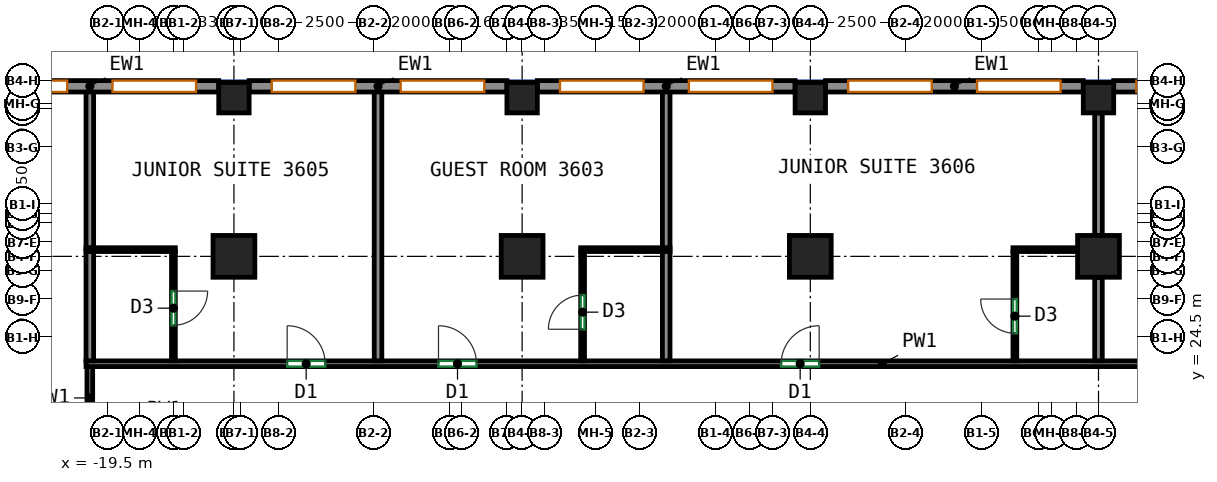
"""IFC4 building model, lengths in metres.
Left out: names, types, materials, properties, quantities, classifications, styles, units other than length and angle.
Written with IfcOpenShell. Run it as: python <this file> out.ifc"""

import sys

from ifc_helpers import new_model, si_unit, direction, frame, frame_2d, origin, origin_2d, place, context, subcontext, project, spatial, rectangle, extrude, source, transform, mapped, element, fill, save


model = new_model("IFC4")
c1 = context("Model", 3, precision=1e-05, world=origin(), true_north=direction((0.0, 1.0)))
c2 = subcontext(c1, "Body", "Model", "MODEL_VIEW")
j1 = project(units=[si_unit("LENGTHUNIT", "METRE"), si_unit("PLANEANGLEUNIT", "RADIAN")], contexts=[c1])
p1 = place(None, origin())
s1 = spatial("IfcSite", under=j1, at=p1, CompositionType="ELEMENT")
p2 = place(p1, origin())
s2 = spatial("IfcBuilding", under=s1, at=p2, CompositionType="ELEMENT")
p3 = place(p2, frame((0.0, 0.0, 157.5)))
s3 = spatial("IfcBuildingStorey", under=s2, at=p3, CompositionType="ELEMENT", Elevation=157.5)
m1 = source(origin(), c2, "Body", "SweptSolid", [
    extrude(rectangle(XDim=1.1, YDim=1.1, at=origin_2d()), origin(), (0.0, 0.0, 1.0), 3.12),
])
p4 = place(p3, frame((-16.167, 26.625, 0.0), z_axis=(0.0, 0.0, 1.0), x_axis=(1.0, 0.0, 0.0)))
e1 = element("IfcColumn", 1, at=p4, inside=s3, PredefinedType="COLUMN", context=c2, shape_type="MappedRepresentation", body=[
    mapped(m1, transform((0.0, 0.0, 0.0))),
])
m2 = source(origin(), c2, "Body", "SweptSolid", [
    extrude(rectangle(XDim=0.8, YDim=0.8, at=origin_2d()), origin(), (0.0, 0.0, 1.0), 3.12),
])
p5 = place(p3, frame((-16.167, 30.8, 0.0), z_axis=(0.0, 0.0, 1.0), x_axis=(1.0, 0.0, 0.0)))
e2 = element("IfcColumn", 2, at=p5, inside=s3, PredefinedType="COLUMN", context=c2, shape_type="MappedRepresentation", body=[
    mapped(m2, transform((0.0, 0.0, 0.0))),
])
p6 = place(p3, frame((-8.583, 26.625, 0.0), z_axis=(0.0, 0.0, 1.0), x_axis=(1.0, 0.0, 0.0)))
e3 = element("IfcColumn", 3, at=p6, inside=s3, PredefinedType="COLUMN", context=c2, shape_type="MappedRepresentation", body=[
    mapped(m1, transform((0.0, 0.0, 0.0))),
])
p7 = place(p3, frame((-8.583, 30.8, 0.0), z_axis=(0.0, 0.0, 1.0), x_axis=(1.0, 0.0, 0.0)))
e4 = element("IfcColumn", 4, at=p7, inside=s3, PredefinedType="COLUMN", context=c2, shape_type="MappedRepresentation", body=[
    mapped(m2, transform((0.0, 0.0, 0.0))),
])
p8 = place(p3, frame((-1.0, 26.625, 0.0), z_axis=(0.0, 0.0, 1.0), x_axis=(1.0, 0.0, 0.0)))
e5 = element("IfcColumn", 5, at=p8, inside=s3, PredefinedType="COLUMN", context=c2, shape_type="MappedRepresentation", body=[
    mapped(m1, transform((0.0, 0.0, 0.0))),
])
p9 = place(p3, frame((-1.0, 30.8, 0.0), z_axis=(0.0, 0.0, 1.0), x_axis=(1.0, 0.0, 0.0)))
e6 = element("IfcColumn", 6, at=p9, inside=s3, PredefinedType="COLUMN", context=c2, shape_type="MappedRepresentation", body=[
    mapped(m2, transform((0.0, 0.0, 0.0))),
])
p10 = place(p3, frame((6.583, 26.625, 0.0), z_axis=(0.0, 0.0, 1.0), x_axis=(1.0, 0.0, 0.0)))
e7 = element("IfcColumn", 7, at=p10, inside=s3, PredefinedType="COLUMN", context=c2, shape_type="MappedRepresentation", body=[
    mapped(m1, transform((0.0, 0.0, 0.0))),
])
p11 = place(p3, frame((6.583, 30.8, 0.0), z_axis=(0.0, 0.0, 1.0), x_axis=(1.0, 0.0, 0.0)))
e8 = element("IfcColumn", 8, at=p11, inside=s3, PredefinedType="COLUMN", context=c2, shape_type="MappedRepresentation", body=[
    mapped(m2, transform((0.0, 0.0, 0.0))),
])
m3 = source(origin(), c2, "Body", "SweptSolid", [
    extrude(rectangle(XDim=6.783, YDim=0.3, at=frame_2d((3.392, 0.0))), origin(), (0.0, 0.0, 1.0), 3.12),
])
p12 = place(p3, frame((13.767, 31.1, 0.0), z_axis=(0.0, 0.0, 1.0), x_axis=(-1.0, 0.0, 0.0)))
e9 = element("IfcWall", 9, at=p12, inside=s3, PredefinedType="SOLIDWALL", context=c2, shape_type="MappedRepresentation", body=[
    mapped(m3, transform((0.0, 0.0, 0.0))),
])
p13 = place(p12, frame((0.596, 0.0, 0.85)))
e10 = element("IfcOpeningElement", 10, at=p13, cuts=e9, PredefinedType="OPENING", context=c2, shape_type="SweptSolid", body=[
    extrude(rectangle(XDim=2.2, YDim=1.95, at=frame_2d((1.1, 0.975))), frame((0.0, 0.16, 0.0), z_axis=(0.0, -1.0, 0.0), x_axis=(1.0, 0.0, 0.0)), (0.0, 0.0, 1.0), 0.32),
])
p14 = place(p12, frame((3.988, 0.0, 0.85)))
e11 = element("IfcOpeningElement", 11, at=p14, cuts=e9, PredefinedType="OPENING", context=c2, shape_type="SweptSolid", body=[
    extrude(rectangle(XDim=2.2, YDim=1.95, at=frame_2d((1.1, 0.975))), frame((0.0, 0.16, 0.0), z_axis=(0.0, -1.0, 0.0), x_axis=(1.0, 0.0, 0.0)), (0.0, 0.0, 1.0), 0.32),
])
m4 = source(origin(), c2, "Body", "SweptSolid", [
    extrude(rectangle(XDim=6.783, YDim=0.3, at=frame_2d((3.392, 0.0))), origin(), (0.0, 0.0, 1.0), 3.12),
])
p15 = place(p3, frame((6.183, 31.1, 0.0), z_axis=(0.0, 0.0, 1.0), x_axis=(-1.0, 0.0, 0.0)))
e12 = element("IfcWall", 12, at=p15, inside=s3, PredefinedType="SOLIDWALL", context=c2, shape_type="MappedRepresentation", body=[
    mapped(m4, transform((0.0, 0.0, 0.0))),
])
p16 = place(p15, frame((0.596, 0.0, 0.85)))
e13 = element("IfcOpeningElement", 13, at=p16, cuts=e12, PredefinedType="OPENING", context=c2, shape_type="SweptSolid", body=[
    extrude(rectangle(XDim=2.2, YDim=1.95, at=frame_2d((1.1, 0.975))), frame((0.0, 0.16, 0.0), z_axis=(0.0, -1.0, 0.0), x_axis=(1.0, 0.0, 0.0)), (0.0, 0.0, 1.0), 0.32),
])
p17 = place(p15, frame((3.988, 0.0, 0.85)))
e14 = element("IfcOpeningElement", 14, at=p17, cuts=e12, PredefinedType="OPENING", context=c2, shape_type="SweptSolid", body=[
    extrude(rectangle(XDim=2.2, YDim=1.95, at=frame_2d((1.1, 0.975))), frame((0.0, 0.16, 0.0), z_axis=(0.0, -1.0, 0.0), x_axis=(1.0, 0.0, 0.0)), (0.0, 0.0, 1.0), 0.32),
])
p18 = place(p3, frame((-1.4, 31.1, 0.0), z_axis=(0.0, 0.0, 1.0), x_axis=(-1.0, 0.0, 0.0)))
e15 = element("IfcWall", 15, at=p18, inside=s3, PredefinedType="SOLIDWALL", context=c2, shape_type="MappedRepresentation", body=[
    mapped(m4, transform((0.0, 0.0, 0.0))),
])
p19 = place(p18, frame((0.596, 0.0, 0.85)))
e16 = element("IfcOpeningElement", 16, at=p19, cuts=e15, PredefinedType="OPENING", context=c2, shape_type="SweptSolid", body=[
    extrude(rectangle(XDim=2.2, YDim=1.95, at=frame_2d((1.1, 0.975))), frame((0.0, 0.16, 0.0), z_axis=(0.0, -1.0, 0.0), x_axis=(1.0, 0.0, 0.0)), (0.0, 0.0, 1.0), 0.32),
])
p20 = place(p18, frame((3.988, 0.0, 0.85)))
e17 = element("IfcOpeningElement", 17, at=p20, cuts=e15, PredefinedType="OPENING", context=c2, shape_type="SweptSolid", body=[
    extrude(rectangle(XDim=2.2, YDim=1.95, at=frame_2d((1.1, 0.975))), frame((0.0, 0.16, 0.0), z_axis=(0.0, -1.0, 0.0), x_axis=(1.0, 0.0, 0.0)), (0.0, 0.0, 1.0), 0.32),
])
p21 = place(p3, frame((-8.983, 31.1, 0.0), z_axis=(0.0, 0.0, 1.0), x_axis=(-1.0, 0.0, 0.0)))
e18 = element("IfcWall", 18, at=p21, inside=s3, PredefinedType="SOLIDWALL", context=c2, shape_type="MappedRepresentation", body=[
    mapped(m3, transform((0.0, 0.0, 0.0))),
])
p22 = place(p21, frame((0.596, 0.0, 0.85)))
e19 = element("IfcOpeningElement", 19, at=p22, cuts=e18, PredefinedType="OPENING", context=c2, shape_type="SweptSolid", body=[
    extrude(rectangle(XDim=2.2, YDim=1.95, at=frame_2d((1.1, 0.975))), frame((0.0, 0.16, 0.0), z_axis=(0.0, -1.0, 0.0), x_axis=(1.0, 0.0, 0.0)), (0.0, 0.0, 1.0), 0.32),
])
p23 = place(p21, frame((3.988, 0.0, 0.85)))
e20 = element("IfcOpeningElement", 20, at=p23, cuts=e18, PredefinedType="OPENING", context=c2, shape_type="SweptSolid", body=[
    extrude(rectangle(XDim=2.2, YDim=1.95, at=frame_2d((1.1, 0.975))), frame((0.0, 0.16, 0.0), z_axis=(0.0, -1.0, 0.0), x_axis=(1.0, 0.0, 0.0)), (0.0, 0.0, 1.0), 0.32),
])
p24 = place(p3, frame((-16.567, 31.1, 0.0), z_axis=(0.0, 0.0, 1.0), x_axis=(-1.0, 0.0, 0.0)))
e21 = element("IfcWall", 21, at=p24, inside=s3, PredefinedType="SOLIDWALL", context=c2, shape_type="MappedRepresentation", body=[
    mapped(m4, transform((0.0, 0.0, 0.0))),
])
p25 = place(p24, frame((0.596, 0.0, 0.85)))
e22 = element("IfcOpeningElement", 22, at=p25, cuts=e21, PredefinedType="OPENING", context=c2, shape_type="SweptSolid", body=[
    extrude(rectangle(XDim=2.2, YDim=1.95, at=frame_2d((1.1, 0.975))), frame((0.0, 0.16, 0.0), z_axis=(0.0, -1.0, 0.0), x_axis=(1.0, 0.0, 0.0)), (0.0, 0.0, 1.0), 0.32),
])
p26 = place(p24, frame((3.988, 0.0, 0.85)))
e23 = element("IfcOpeningElement", 23, at=p26, cuts=e21, PredefinedType="OPENING", context=c2, shape_type="SweptSolid", body=[
    extrude(rectangle(XDim=2.2, YDim=1.95, at=frame_2d((1.1, 0.975))), frame((0.0, 0.16, 0.0), z_axis=(0.0, -1.0, 0.0), x_axis=(1.0, 0.0, 0.0)), (0.0, 0.0, 1.0), 0.32),
])
p27 = place(p3, frame((-19.959, 22.075, 0.0), z_axis=(0.0, 0.0, 1.0), x_axis=(0.0, 1.0, 0.0)))
e24 = element("IfcWall", 24, at=p27, inside=s3, PredefinedType="PARTITIONING", context=c2, shape_type="SweptSolid", body=[
    extrude(rectangle(XDim=1.65, YDim=0.15, at=frame_2d((0.825, 0.0))), origin(), (0.0, 0.0, 1.0), 3.12),
])
p28 = place(p3, frame((-20.059, 23.8, 0.0), z_axis=(0.0, 0.0, 1.0), x_axis=(1.0, 0.0, 0.0)))
e25 = element("IfcWall", 25, at=p28, inside=s3, PredefinedType="PARTITIONING", context=c2, shape_type="SweptSolid", body=[
    extrude(rectangle(XDim=41.909, YDim=0.15, at=frame_2d((20.955, 0.0))), origin(), (0.0, 0.0, 1.0), 3.12),
])
p29 = place(p28, frame((5.293, 0.0, 0.0)))
e26 = element("IfcOpeningElement", 26, at=p29, cuts=e25, PredefinedType="OPENING", context=c2, shape_type="SweptSolid", body=[
    extrude(rectangle(XDim=1.0, YDim=2.1, at=frame_2d((0.5, 1.05))), frame((0.0, 0.085, 0.0), z_axis=(0.0, -1.0, 0.0), x_axis=(1.0, 0.0, 0.0)), (0.0, 0.0, 1.0), 0.17),
])
p30 = place(p28, frame((9.275, 0.0, 0.0)))
e27 = element("IfcOpeningElement", 27, at=p30, cuts=e25, PredefinedType="OPENING", context=c2, shape_type="SweptSolid", body=[
    extrude(rectangle(XDim=1.0, YDim=2.1, at=frame_2d((0.5, 1.05))), frame((0.0, 0.085, 0.0), z_axis=(0.0, -1.0, 0.0), x_axis=(1.0, 0.0, 0.0)), (0.0, 0.0, 1.0), 0.17),
])
p31 = place(p28, frame((18.292, 0.0, 0.0)))
e28 = element("IfcOpeningElement", 28, at=p31, cuts=e25, PredefinedType="OPENING", context=c2, shape_type="SweptSolid", body=[
    extrude(rectangle(XDim=1.0, YDim=2.1, at=frame_2d((0.5, 1.05))), frame((0.0, 0.085, 0.0), z_axis=(0.0, -1.0, 0.0), x_axis=(1.0, 0.0, 0.0)), (0.0, 0.0, 1.0), 0.17),
])
p32 = place(p28, frame((30.636, 0.0, 0.0)))
e29 = element("IfcOpeningElement", 29, at=p32, cuts=e25, PredefinedType="OPENING", context=c2, shape_type="SweptSolid", body=[
    extrude(rectangle(XDim=1.0, YDim=2.1, at=frame_2d((0.5, 1.05))), frame((0.0, 0.085, 0.0), z_axis=(0.0, -1.0, 0.0), x_axis=(1.0, 0.0, 0.0)), (0.0, 0.0, 1.0), 0.17),
])
p33 = place(p28, frame((36.828, 0.0, 0.0)))
e30 = element("IfcOpeningElement", 30, at=p33, cuts=e25, PredefinedType="OPENING", context=c2, shape_type="SweptSolid", body=[
    extrude(rectangle(XDim=1.0, YDim=2.1, at=frame_2d((0.5, 1.05))), frame((0.0, 0.085, 0.0), z_axis=(0.0, -1.0, 0.0), x_axis=(1.0, 0.0, 0.0)), (0.0, 0.0, 1.0), 0.17),
])
p34 = place(p28, frame((38.314, 0.0, 0.0)))
e31 = element("IfcOpeningElement", 31, at=p34, cuts=e25, PredefinedType="OPENING", context=c2, shape_type="SweptSolid", body=[
    extrude(rectangle(XDim=1.0, YDim=2.1, at=frame_2d((0.5, 1.05))), frame((0.0, 0.085, 0.0), z_axis=(0.0, -1.0, 0.0), x_axis=(1.0, 0.0, 0.0)), (0.0, 0.0, 1.0), 0.17),
])
p35 = place(p3, frame((-19.959, 26.842, 0.0), z_axis=(0.0, 0.0, 1.0), x_axis=(0.0, 1.0, 0.0)))
e32 = element("IfcWall", 32, at=p35, inside=s3, PredefinedType="PARTITIONING", context=c2, shape_type="SweptSolid", body=[
    extrude(rectangle(XDim=4.158, YDim=0.2, at=frame_2d((2.079, 0.0))), origin(), (0.0, 0.0, 1.0), 3.12),
])
p36 = place(p3, frame((-19.959, 23.877, 0.0), z_axis=(0.0, 0.0, 1.0), x_axis=(0.0, 1.0, 0.0)))
e33 = element("IfcWall", 33, at=p36, inside=s3, PredefinedType="PARTITIONING", context=c2, shape_type="SweptSolid", body=[
    extrude(rectangle(XDim=2.885, YDim=0.2, at=frame_2d((1.442, 0.0))), origin(), (0.0, 0.0, 1.0), 3.12),
])
p37 = place(p3, frame((-17.759, 26.752, 0.0), z_axis=(0.0, 0.0, 1.0), x_axis=(0.0, -1.0, 0.0)))
e34 = element("IfcWall", 34, at=p37, inside=s3, PredefinedType="PARTITIONING", context=c2, shape_type="SweptSolid", body=[
    extrude(rectangle(XDim=2.875, YDim=0.1, at=frame_2d((1.438, 0.0))), origin(), (0.0, 0.0, 1.0), 3.12),
])
p38 = place(p37, frame((1.04, 0.0, 0.0)))
e35 = element("IfcOpeningElement", 35, at=p38, cuts=e34, PredefinedType="OPENING", context=c2, shape_type="SweptSolid", body=[
    extrude(rectangle(XDim=0.9, YDim=2.1, at=frame_2d((0.45, 1.05))), frame((0.0, 0.06, 0.0), z_axis=(0.0, -1.0, 0.0), x_axis=(1.0, 0.0, 0.0)), (0.0, 0.0, 1.0), 0.12),
])
p39 = place(p3, frame((-20.059, 26.802, 0.0), z_axis=(0.0, 0.0, 1.0), x_axis=(1.0, 0.0, 0.0)))
e36 = element("IfcWall", 36, at=p39, inside=s3, PredefinedType="PARTITIONING", context=c2, shape_type="SweptSolid", body=[
    extrude(rectangle(XDim=2.35, YDim=0.1, at=frame_2d((1.175, 0.0))), origin(), (0.0, 0.0, 1.0), 3.12),
])
p40 = place(p3, frame((-12.375, 23.877, 0.0), z_axis=(0.0, 0.0, 1.0), x_axis=(0.0, 1.0, 0.0)))
e37 = element("IfcWall", 37, at=p40, inside=s3, PredefinedType="PARTITIONING", context=c2, shape_type="SweptSolid", body=[
    extrude(rectangle(XDim=7.123, YDim=0.2, at=frame_2d((3.562, 0.0))), origin(), (0.0, 0.0, 1.0), 3.12),
])
p41 = place(p3, frame((-7.042, 26.802, 0.0), z_axis=(0.0, 0.0, 1.0), x_axis=(1.0, 0.0, 0.0)))
e38 = element("IfcWall", 38, at=p41, inside=s3, PredefinedType="PARTITIONING", context=c2, shape_type="SweptSolid", body=[
    extrude(rectangle(XDim=2.35, YDim=0.1, at=frame_2d((1.175, 0.0))), origin(), (0.0, 0.0, 1.0), 3.12),
])
p42 = place(p3, frame((-6.992, 23.877, 0.0), z_axis=(0.0, 0.0, 1.0), x_axis=(0.0, 1.0, 0.0)))
e39 = element("IfcWall", 39, at=p42, inside=s3, PredefinedType="PARTITIONING", context=c2, shape_type="SweptSolid", body=[
    extrude(rectangle(XDim=2.875, YDim=0.1, at=frame_2d((1.438, 0.0))), origin(), (0.0, 0.0, 1.0), 3.12),
])
p43 = place(p42, frame((0.83, 0.0, 0.0)))
e40 = element("IfcOpeningElement", 40, at=p43, cuts=e39, PredefinedType="OPENING", context=c2, shape_type="SweptSolid", body=[
    extrude(rectangle(XDim=0.9, YDim=2.1, at=frame_2d((0.45, 1.05))), frame((0.0, 0.06, 0.0), z_axis=(0.0, -1.0, 0.0), x_axis=(1.0, 0.0, 0.0)), (0.0, 0.0, 1.0), 0.12),
])
p44 = place(p3, frame((-4.792, 26.852, 0.0), z_axis=(0.0, 0.0, 1.0), x_axis=(0.0, 1.0, 0.0)))
e41 = element("IfcWall", 41, at=p44, inside=s3, PredefinedType="PARTITIONING", context=c2, shape_type="SweptSolid", body=[
    extrude(rectangle(XDim=4.148, YDim=0.2, at=frame_2d((2.074, 0.0))), origin(), (0.0, 0.0, 1.0), 3.12),
])
p45 = place(p3, frame((-4.792, 23.877, 0.0), z_axis=(0.0, 0.0, 1.0), x_axis=(0.0, 1.0, 0.0)))
e42 = element("IfcWall", 42, at=p45, inside=s3, PredefinedType="PARTITIONING", context=c2, shape_type="SweptSolid", body=[
    extrude(rectangle(XDim=2.875, YDim=0.2, at=frame_2d((1.438, 0.0))), origin(), (0.0, 0.0, 1.0), 3.12),
])
p46 = place(p3, frame((4.333, 26.802, 0.0), z_axis=(0.0, 0.0, 1.0), x_axis=(1.0, 0.0, 0.0)))
e43 = element("IfcWall", 43, at=p46, inside=s3, PredefinedType="PARTITIONING", context=c2, shape_type="SweptSolid", body=[
    extrude(rectangle(XDim=1.7, YDim=0.1, at=frame_2d((0.85, 0.0))), origin(), (0.0, 0.0, 1.0), 3.12),
])
p47 = place(p3, frame((4.383, 23.877, 0.0), z_axis=(0.0, 0.0, 1.0), x_axis=(0.0, 1.0, 0.0)))
e44 = element("IfcWall", 44, at=p47, inside=s3, PredefinedType="PARTITIONING", context=c2, shape_type="SweptSolid", body=[
    extrude(rectangle(XDim=2.875, YDim=0.1, at=frame_2d((1.438, 0.0))), origin(), (0.0, 0.0, 1.0), 3.12),
])
p48 = place(p47, frame((0.725, 0.0, 0.0)))
e45 = element("IfcOpeningElement", 45, at=p48, cuts=e44, PredefinedType="OPENING", context=c2, shape_type="SweptSolid", body=[
    extrude(rectangle(XDim=0.9, YDim=2.1, at=frame_2d((0.45, 1.05))), frame((0.0, 0.06, 0.0), z_axis=(0.0, -1.0, 0.0), x_axis=(1.0, 0.0, 0.0)), (0.0, 0.0, 1.0), 0.12),
])
p49 = place(p3, frame((6.583, 27.175, 0.0), z_axis=(0.0, 0.0, 1.0), x_axis=(0.0, 1.0, 0.0)))
e46 = element("IfcWall", 46, at=p49, inside=s3, PredefinedType="PARTITIONING", context=c2, shape_type="SweptSolid", body=[
    extrude(rectangle(XDim=3.225, YDim=0.2, at=frame_2d((1.612, 0.0))), origin(), (0.0, 0.0, 1.0), 3.12),
])
p50 = place(p3, frame((6.583, 23.877, 0.0), z_axis=(0.0, 0.0, 1.0), x_axis=(0.0, 1.0, 0.0)))
e47 = element("IfcWall", 47, at=p50, inside=s3, PredefinedType="PARTITIONING", context=c2, shape_type="SweptSolid", body=[
    extrude(rectangle(XDim=2.198, YDim=0.2, at=frame_2d((1.099, 0.0))), origin(), (0.0, 0.0, 1.0), 3.12),
])
p51 = place(p14, origin())
e48 = element("IfcWindow", 48, at=p51, inside=s3, PartitioningType="SINGLE_PANEL", PredefinedType="WINDOW", context=c2, shape_type="SweptSolid", body=[
    extrude(rectangle(XDim=2.2, YDim=1.95, at=frame_2d((1.1, 0.975))), frame((0.0, 0.03, 0.0), z_axis=(0.0, -1.0, 0.0), x_axis=(1.0, 0.0, 0.0)), (0.0, 0.0, 1.0), 0.06),
])
fill(e11, e48)
p52 = place(p16, origin())
e49 = element("IfcWindow", 49, at=p52, inside=s3, PartitioningType="SINGLE_PANEL", PredefinedType="WINDOW", context=c2, shape_type="SweptSolid", body=[
    extrude(rectangle(XDim=2.2, YDim=1.95, at=frame_2d((1.1, 0.975))), frame((0.0, 0.03, 0.0), z_axis=(0.0, -1.0, 0.0), x_axis=(1.0, 0.0, 0.0)), (0.0, 0.0, 1.0), 0.06),
])
fill(e13, e49)
p53 = place(p17, origin())
e50 = element("IfcWindow", 50, at=p53, inside=s3, PartitioningType="SINGLE_PANEL", PredefinedType="WINDOW", context=c2, shape_type="SweptSolid", body=[
    extrude(rectangle(XDim=2.2, YDim=1.95, at=frame_2d((1.1, 0.975))), frame((0.0, 0.03, 0.0), z_axis=(0.0, -1.0, 0.0), x_axis=(1.0, 0.0, 0.0)), (0.0, 0.0, 1.0), 0.06),
])
fill(e14, e50)
p54 = place(p19, origin())
e51 = element("IfcWindow", 51, at=p54, inside=s3, PartitioningType="SINGLE_PANEL", PredefinedType="WINDOW", context=c2, shape_type="SweptSolid", body=[
    extrude(rectangle(XDim=2.2, YDim=1.95, at=frame_2d((1.1, 0.975))), frame((0.0, 0.03, 0.0), z_axis=(0.0, -1.0, 0.0), x_axis=(1.0, 0.0, 0.0)), (0.0, 0.0, 1.0), 0.06),
])
fill(e16, e51)
p55 = place(p20, origin())
e52 = element("IfcWindow", 52, at=p55, inside=s3, PartitioningType="SINGLE_PANEL", PredefinedType="WINDOW", context=c2, shape_type="SweptSolid", body=[
    extrude(rectangle(XDim=2.2, YDim=1.95, at=frame_2d((1.1, 0.975))), frame((0.0, 0.03, 0.0), z_axis=(0.0, -1.0, 0.0), x_axis=(1.0, 0.0, 0.0)), (0.0, 0.0, 1.0), 0.06),
])
fill(e17, e52)
p56 = place(p22, origin())
e53 = element("IfcWindow", 53, at=p56, inside=s3, PartitioningType="SINGLE_PANEL", PredefinedType="WINDOW", context=c2, shape_type="SweptSolid", body=[
    extrude(rectangle(XDim=2.2, YDim=1.95, at=frame_2d((1.1, 0.975))), frame((0.0, 0.03, 0.0), z_axis=(0.0, -1.0, 0.0), x_axis=(1.0, 0.0, 0.0)), (0.0, 0.0, 1.0), 0.06),
])
fill(e19, e53)
p57 = place(p23, origin())
e54 = element("IfcWindow", 54, at=p57, inside=s3, PartitioningType="SINGLE_PANEL", PredefinedType="WINDOW", context=c2, shape_type="SweptSolid", body=[
    extrude(rectangle(XDim=2.2, YDim=1.95, at=frame_2d((1.1, 0.975))), frame((0.0, 0.03, 0.0), z_axis=(0.0, -1.0, 0.0), x_axis=(1.0, 0.0, 0.0)), (0.0, 0.0, 1.0), 0.06),
])
fill(e20, e54)
p58 = place(p25, origin())
e55 = element("IfcWindow", 55, at=p58, inside=s3, PartitioningType="SINGLE_PANEL", PredefinedType="WINDOW", context=c2, shape_type="SweptSolid", body=[
    extrude(rectangle(XDim=2.2, YDim=1.95, at=frame_2d((1.1, 0.975))), frame((0.0, 0.03, 0.0), z_axis=(0.0, -1.0, 0.0), x_axis=(1.0, 0.0, 0.0)), (0.0, 0.0, 1.0), 0.06),
])
fill(e22, e55)
p59 = place(p26, origin())
e56 = element("IfcWindow", 56, at=p59, inside=s3, PartitioningType="SINGLE_PANEL", PredefinedType="WINDOW", context=c2, shape_type="SweptSolid", body=[
    extrude(rectangle(XDim=2.2, YDim=1.95, at=frame_2d((1.1, 0.975))), frame((0.0, 0.03, 0.0), z_axis=(0.0, -1.0, 0.0), x_axis=(1.0, 0.0, 0.0)), (0.0, 0.0, 1.0), 0.06),
])
fill(e23, e56)
p60 = place(p29, origin())
e57 = element("IfcDoor", 57, at=p60, inside=s3, OperationType="SINGLE_SWING_LEFT", PredefinedType="DOOR", context=c2, shape_type="SweptSolid", body=[
    extrude(rectangle(XDim=1.0, YDim=2.1, at=frame_2d((0.5, 1.05))), frame((0.0, 0.025, 0.0), z_axis=(0.0, -1.0, 0.0), x_axis=(1.0, 0.0, 0.0)), (0.0, 0.0, 1.0), 0.05),
])
fill(e26, e57)
p61 = place(p30, origin())
e58 = element("IfcDoor", 58, at=p61, inside=s3, OperationType="SINGLE_SWING_LEFT", PredefinedType="DOOR", context=c2, shape_type="SweptSolid", body=[
    extrude(rectangle(XDim=1.0, YDim=2.1, at=frame_2d((0.5, 1.05))), frame((0.0, 0.025, 0.0), z_axis=(0.0, -1.0, 0.0), x_axis=(1.0, 0.0, 0.0)), (0.0, 0.0, 1.0), 0.05),
])
fill(e27, e58)
p62 = place(p31, origin())
e59 = element("IfcDoor", 59, at=p62, inside=s3, OperationType="SINGLE_SWING_RIGHT", PredefinedType="DOOR", context=c2, shape_type="SweptSolid", body=[
    extrude(rectangle(XDim=1.0, YDim=2.1, at=frame_2d((0.5, 1.05))), frame((0.0, 0.025, 0.0), z_axis=(0.0, -1.0, 0.0), x_axis=(1.0, 0.0, 0.0)), (0.0, 0.0, 1.0), 0.05),
])
fill(e28, e59)
p63 = place(p48, origin())
e60 = element("IfcDoor", 60, at=p63, inside=s3, OperationType="SINGLE_SWING_RIGHT", PredefinedType="DOOR", context=c2, shape_type="SweptSolid", body=[
    extrude(rectangle(XDim=0.9, YDim=2.1, at=frame_2d((0.45, 1.05))), frame((0.0, 0.025, 0.0), z_axis=(0.0, -1.0, 0.0), x_axis=(1.0, 0.0, 0.0)), (0.0, 0.0, 1.0), 0.05),
])
fill(e45, e60)
p64 = place(p43, origin())
e61 = element("IfcDoor", 61, at=p64, inside=s3, OperationType="SINGLE_SWING_LEFT", PredefinedType="DOOR", context=c2, shape_type="SweptSolid", body=[
    extrude(rectangle(XDim=0.9, YDim=2.1, at=frame_2d((0.45, 1.05))), frame((0.0, 0.025, 0.0), z_axis=(0.0, -1.0, 0.0), x_axis=(1.0, 0.0, 0.0)), (0.0, 0.0, 1.0), 0.05),
])
fill(e40, e61)
p65 = place(p38, origin())
e62 = element("IfcDoor", 62, at=p65, inside=s3, OperationType="SINGLE_SWING_LEFT", PredefinedType="DOOR", context=c2, shape_type="SweptSolid", body=[
    extrude(rectangle(XDim=0.9, YDim=2.1, at=frame_2d((0.45, 1.05))), frame((0.0, 0.025, 0.0), z_axis=(0.0, -1.0, 0.0), x_axis=(1.0, 0.0, 0.0)), (0.0, 0.0, 1.0), 0.05),
])
fill(e35, e62)
save(model, sys.argv[1])
